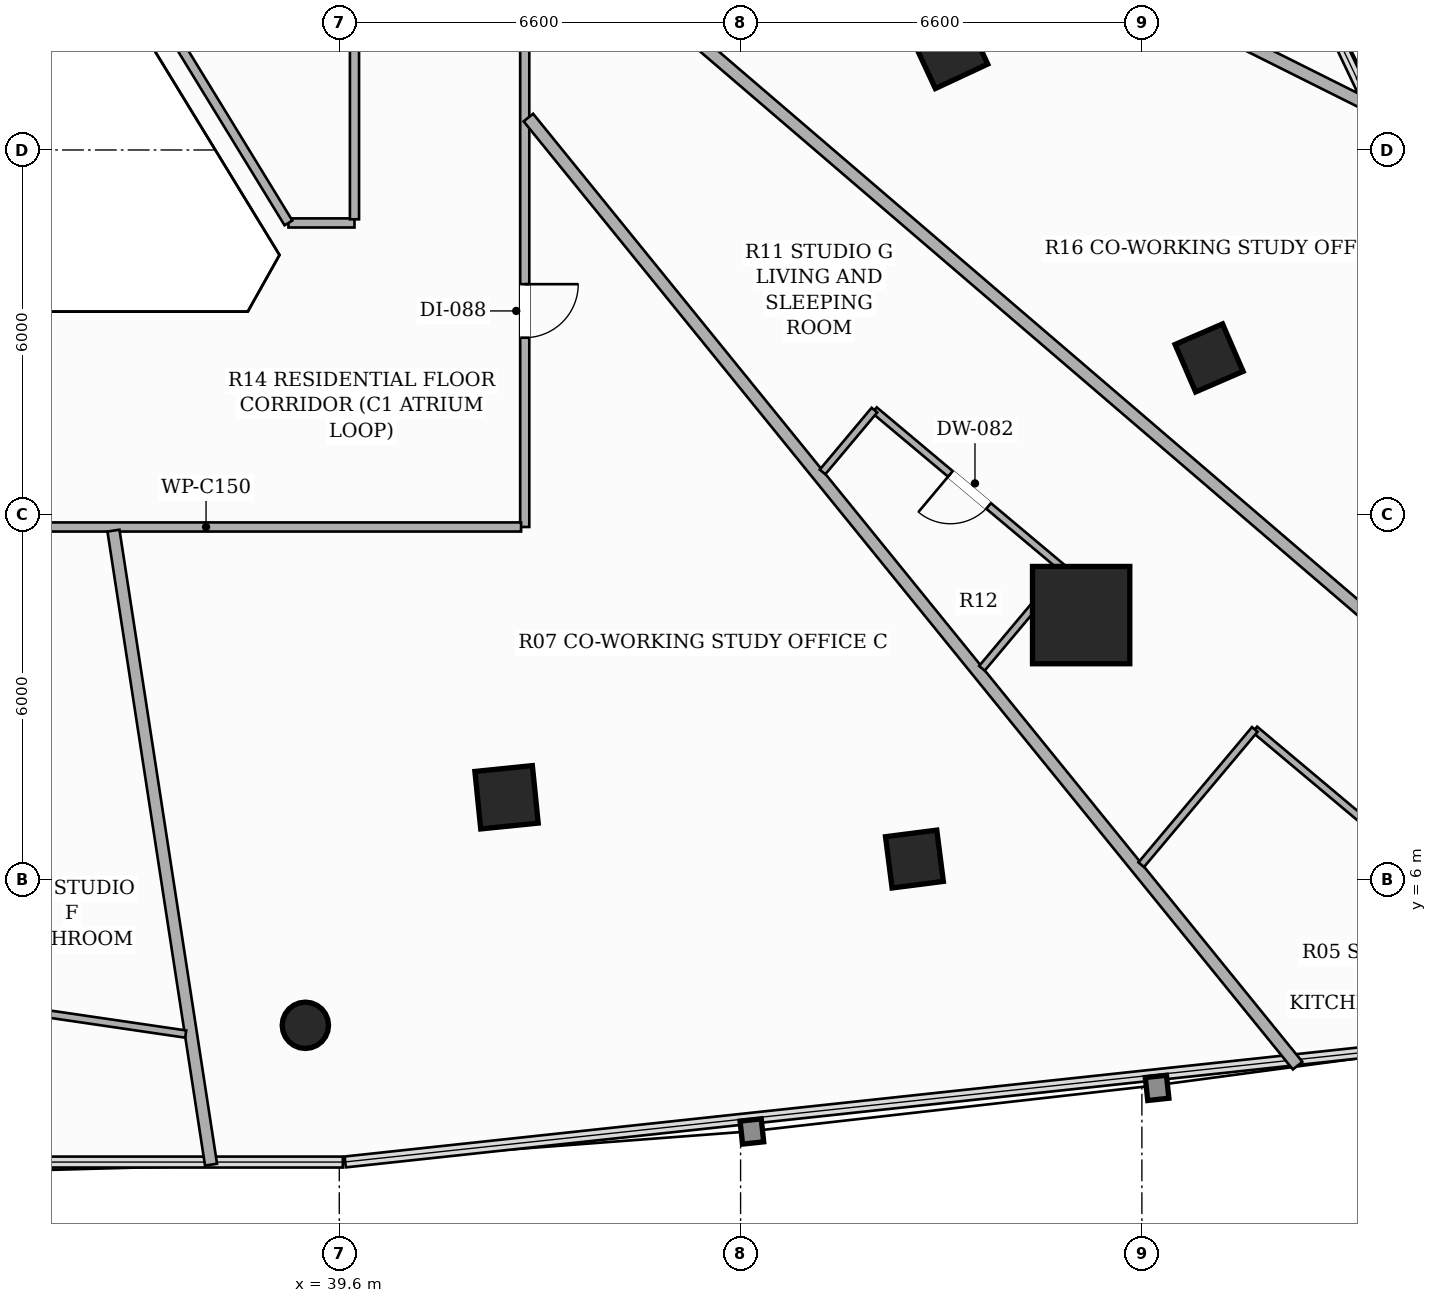
"""IFC4 building model, lengths in metres.
Left out: names, types, materials, properties, quantities, classifications, styles, units other than length and angle.
Written with IfcOpenShell. Run it as: python <this file> out.ifc"""

import sys

from ifc_helpers import new_model, si_unit, direction, frame, frame_2d, origin, origin_2d, place, context, subcontext, project, spatial, rectangle, hollow_rectangle, hollow_circle, extrude, element, fill, save


model = new_model("IFC4")
c1 = context("Model", 3, precision=1e-05, world=origin(), true_north=direction((0.0, 1.0)))
c2 = subcontext(c1, "Body", "Model", "MODEL_VIEW")
j1 = project(units=[si_unit("LENGTHUNIT", "METRE"), si_unit("PLANEANGLEUNIT", "RADIAN")], contexts=[c1])
p1 = place(None, origin())
s1 = spatial("IfcSite", under=j1, at=p1, CompositionType="ELEMENT")
p2 = place(p1, origin())
s2 = spatial("IfcBuilding", under=s1, at=p2, CompositionType="ELEMENT")
p3 = place(p2, frame((0.0, 0.0, 36.8)))
s3 = spatial("IfcBuildingStorey", under=s2, at=p3, CompositionType="ELEMENT", Elevation=36.8)
p4 = place(p3, frame((51.801, 10.351, 0.0), z_axis=(0.0, 0.0, 1.0), x_axis=(1.0, 0.0, 0.0)))
e1 = element("IfcColumn", 1, at=p4, inside=s3, PredefinedType="COLUMN", context=c2, shape_type="SweptSolid", body=[
    extrude(hollow_rectangle(XDim=1.6, YDim=1.6, WallThickness=0.05, at=origin_2d()), origin(), (0.0, 0.0, 1.0), 3.3),
])
for number, where, z_axis, x_axis in (
    (2, (42.351, 7.355, 0.0), (0.0, 0.0, 1.0), (0.995, 0.101, 0.0)),
    (3, (49.633, 19.642, 0.0), (0.0, 0.0, 1.0), (-0.423, 0.906, 0.0)),
):
    element("IfcColumn", number, at=place(p3, frame(where, z_axis=z_axis, x_axis=x_axis)), inside=s3, PredefinedType="COLUMN", context=c2, shape_type="SweptSolid", body=[
        extrude(hollow_rectangle(XDim=0.95, YDim=0.95, WallThickness=0.032, at=origin_2d()), origin(), (0.0, 0.0, 1.0), 3.3),
    ])
for number, where, z_axis, x_axis in (
    (4, (49.059, 6.339, 0.0), (0.0, 0.0, 1.0), (0.992, 0.127, 0.0)),
    (5, (53.905, 14.58, 0.0), (0.0, 0.0, 1.0), (-0.397, 0.918, 0.0)),
):
    element("IfcColumn", number, at=place(p3, frame(where, z_axis=z_axis, x_axis=x_axis)), inside=s3, PredefinedType="COLUMN", context=c2, shape_type="SweptSolid", body=[
        extrude(hollow_rectangle(XDim=0.85, YDim=0.85, WallThickness=0.028, at=origin_2d()), origin(), (0.0, 0.0, 1.0), 3.3),
    ])
p5 = place(p3, frame((39.042, 3.605, 0.0), z_axis=(0.0, 0.0, 1.0), x_axis=(1.0, 0.0, 0.0)))
e6 = element("IfcColumn", 6, at=p5, inside=s3, PredefinedType="COLUMN", context=c2, shape_type="SweptSolid", body=[
    extrude(hollow_circle(Radius=0.381, WallThickness=0.022, at=origin_2d()), origin(), (0.0, 0.0, 1.0), 3.3),
])
p6 = place(p3, frame((42.65, 36.84, 0.0), z_axis=(0.0, 0.0, 1.0), x_axis=(0.0, -1.0, 0.0)))
e7 = element("IfcWall", 7, at=p6, inside=s3, PredefinedType="PARTITIONING", context=c2, shape_type="SweptSolid", body=[
    extrude(rectangle(XDim=25.04, YDim=0.15, at=frame_2d((12.52, 0.0))), origin(), (0.0, 0.0, 1.0), 2.413),
])
p7 = place(p6, frame((1.219, 0.0, 0.0)))
e8 = element("IfcOpeningElement", 8, at=p7, cuts=e7, PredefinedType="OPENING", context=c2, shape_type="SweptSolid", body=[
    extrude(rectangle(XDim=0.88, YDim=2.1, at=frame_2d((0.44, 1.05))), frame((0.0, 0.085, 0.0), z_axis=(0.0, -1.0, 0.0), x_axis=(1.0, 0.0, 0.0)), (0.0, 0.0, 1.0), 0.17),
])
p8 = place(p6, frame((21.047, 0.0, 0.0)))
e9 = element("IfcOpeningElement", 9, at=p8, cuts=e7, PredefinedType="OPENING", context=c2, shape_type="SweptSolid", body=[
    extrude(rectangle(XDim=0.88, YDim=2.1, at=frame_2d((0.44, 1.05))), frame((0.0, 0.085, 0.0), z_axis=(0.0, -1.0, 0.0), x_axis=(1.0, 0.0, 0.0)), (0.0, 0.0, 1.0), 0.17),
])
p9 = place(p6, frame((16.029, 0.0, 0.0)))
e10 = element("IfcOpeningElement", 10, at=p9, cuts=e7, PredefinedType="OPENING", context=c2, shape_type="SweptSolid", body=[
    extrude(rectangle(XDim=0.92, YDim=2.15, at=frame_2d((0.46, 1.075))), frame((0.0, 0.085, 0.0), z_axis=(0.0, -1.0, 0.0), x_axis=(1.0, 0.0, 0.0)), (0.0, 0.0, 1.0), 0.17),
])
p10 = place(p6, frame((12.486, 0.0, 0.0)))
e11 = element("IfcOpeningElement", 11, at=p10, cuts=e7, PredefinedType="OPENING", context=c2, shape_type="SweptSolid", body=[
    extrude(rectangle(XDim=0.88, YDim=2.1, at=frame_2d((0.44, 1.05))), frame((0.0, 0.085, 0.0), z_axis=(0.0, -1.0, 0.0), x_axis=(1.0, 0.0, 0.0)), (0.0, 0.0, 1.0), 0.17),
])
p11 = place(p6, frame((6.638, 0.0, 0.0)))
e12 = element("IfcOpeningElement", 12, at=p11, cuts=e7, PredefinedType="OPENING", context=c2, shape_type="SweptSolid", body=[
    extrude(rectangle(XDim=0.92, YDim=2.15, at=frame_2d((0.46, 1.075))), frame((0.0, 0.085, 0.0), z_axis=(0.0, -1.0, 0.0), x_axis=(1.0, 0.0, 0.0)), (0.0, 0.0, 1.0), 0.17),
])
p12 = place(p3, frame((42.59, 11.8, 0.0), z_axis=(0.0, 0.0, 1.0), x_axis=(-1.0, 0.0, 0.0)))
e13 = element("IfcWall", 13, at=p12, inside=s3, PredefinedType="PARTITIONING", context=c2, shape_type="SweptSolid", body=[
    extrude(rectangle(XDim=19.24, YDim=0.15, at=frame_2d((9.62, 0.0))), origin(), (0.0, 0.0, 1.0), 2.669),
])
p13 = place(p12, frame((10.462, 0.0, 0.0)))
e14 = element("IfcOpeningElement", 14, at=p13, cuts=e13, PredefinedType="OPENING", context=c2, shape_type="SweptSolid", body=[
    extrude(rectangle(XDim=0.92, YDim=2.15, at=frame_2d((0.46, 1.075))), frame((0.0, 0.085, 0.0), z_axis=(0.0, -1.0, 0.0), x_axis=(1.0, 0.0, 0.0)), (0.0, 0.0, 1.0), 0.17),
])
p14 = place(p3, frame((38.764, 16.8, 0.0), z_axis=(0.0, 0.0, 1.0), x_axis=(1.0, 0.0, 0.0)))
e15 = element("IfcWall", 15, at=p14, inside=s3, PredefinedType="PARTITIONING", context=c2, shape_type="SweptSolid", body=[
    extrude(rectangle(XDim=1.086, YDim=0.15, at=frame_2d((0.543, 0.0))), origin(), (0.0, 0.0, 1.0), 3.06),
])
p15 = place(p3, frame((39.85, 16.86, 0.0), z_axis=(0.0, 0.0, 1.0), x_axis=(0.0, 1.0, 0.0)))
e16 = element("IfcWall", 16, at=p15, inside=s3, PredefinedType="PARTITIONING", context=c2, shape_type="SweptSolid", body=[
    extrude(rectangle(XDim=6.99, YDim=0.15, at=frame_2d((3.495, 0.0))), origin(), (0.0, 0.0, 1.0), 2.669),
])
p16 = place(p15, frame((3.055, 0.0, 0.0)))
e17 = element("IfcOpeningElement", 17, at=p16, cuts=e16, PredefinedType="OPENING", context=c2, shape_type="SweptSolid", body=[
    extrude(rectangle(XDim=0.88, YDim=2.1, at=frame_2d((0.44, 1.05))), frame((0.0, 0.085, 0.0), z_axis=(0.0, -1.0, 0.0), x_axis=(1.0, 0.0, 0.0)), (0.0, 0.0, 1.0), 0.17),
])
p17 = place(p3, frame((34.486, 23.79, 0.0), z_axis=(0.0, 0.0, 1.0), x_axis=(0.521998190399, -0.852946592244, 0.0)))
e18 = element("IfcWall", 18, at=p17, inside=s3, PredefinedType="PARTITIONING", context=c2, shape_type="SweptSolid", body=[
    extrude(rectangle(XDim=8.195, YDim=0.15, at=frame_2d((4.098, 0.0))), origin(), (0.0, 0.0, 1.0), 2.669),
])
p18 = place(p3, frame((37.491, 1.313, 0.0), z_axis=(0.0, 0.0, 1.0), x_axis=(-0.152133698634, 0.988359923176, 0.0)))
e19 = element("IfcWall", 19, at=p18, inside=s3, PredefinedType="PARTITIONING", context=c2, shape_type="SweptSolid", body=[
    extrude(rectangle(XDim=10.55, YDim=0.2, at=frame_2d((5.275, 0.0))), origin(), (0.0, 0.0, 1.0), 2.413),
])
p19 = place(p3, frame((42.71, 18.533, 0.0), z_axis=(0.0, 0.0, 1.0), x_axis=(0.630093983448, -0.776518880661, 0.0)))
e20 = element("IfcWall", 20, at=p19, inside=s3, PredefinedType="PARTITIONING", context=c2, shape_type="SweptSolid", body=[
    extrude(rectangle(XDim=20.078, YDim=0.2, at=frame_2d((10.039, 0.0))), origin(), (0.0, 0.0, 1.0), 2.413),
])
p20 = place(p3, frame((42.71, 22.173, 0.0), z_axis=(0.0, 0.0, 1.0), x_axis=(0.759115981911, -0.650955394791, 0.0)))
e21 = element("IfcWall", 21, at=p20, inside=s3, PredefinedType="PARTITIONING", context=c2, shape_type="SweptSolid", body=[
    extrude(rectangle(XDim=25.249, YDim=0.2, at=frame_2d((12.625, 0.0))), origin(), (0.0, 0.0, 1.0), 2.413),
])
p21 = place(p3, frame((42.71, 25.644, 0.0), z_axis=(0.0, 0.0, 1.0), x_axis=(0.894389742198, -0.447288485265, 0.0)))
e22 = element("IfcWall", 22, at=p21, inside=s3, PredefinedType="PARTITIONING", context=c2, shape_type="SweptSolid", body=[
    extrude(rectangle(XDim=15.648, YDim=0.2, at=frame_2d((7.824, 0.0))), origin(), (0.0, 0.0, 1.0), 2.413),
])
p22 = place(p3, frame((33.321, 4.011, 0.0), z_axis=(0.0, 0.0, 1.0), x_axis=(0.98942932615, -0.145015890698, 0.0)))
e23 = element("IfcWall", 23, at=p22, inside=s3, PredefinedType="PARTITIONING", context=c2, shape_type="SweptSolid", body=[
    extrude(rectangle(XDim=3.793, YDim=0.12, at=frame_2d((1.896, 0.0))), origin(), (0.0, 0.0, 1.0), 3.06),
])
p23 = place(p3, frame((50.169, 9.476, 0.0), z_axis=(0.0, 0.0, 1.0), x_axis=(0.642802339764, 0.766032082875, 0.0)))
e24 = element("IfcWall", 24, at=p23, inside=s3, PredefinedType="PARTITIONING", context=c2, shape_type="SweptSolid", body=[
    extrude(rectangle(XDim=2.116, YDim=0.12, at=frame_2d((1.058, 0.0))), origin(), (0.0, 0.0, 1.0), 2.413),
])
p24 = place(p3, frame((51.529, 11.097, 0.0), z_axis=(0.0, 0.0, 1.0), x_axis=(-0.766026296222, 0.642809235696, 0.0)))
e25 = element("IfcWall", 25, at=p24, inside=s3, PredefinedType="PARTITIONING", context=c2, shape_type="SweptSolid", body=[
    extrude(rectangle(XDim=4.084, YDim=0.12, at=frame_2d((2.042, 0.0))), origin(), (0.0, 0.0, 1.0), 2.413),
])
p25 = place(p24, frame((1.632, 0.0, 0.0)))
e26 = element("IfcOpeningElement", 26, at=p25, cuts=e25, PredefinedType="OPENING", context=c2, shape_type="SweptSolid", body=[
    extrude(rectangle(XDim=0.82, YDim=2.1, at=frame_2d((0.41, 1.05))), frame((0.0, 0.07, 0.0), z_axis=(0.0, -1.0, 0.0), x_axis=(1.0, 0.0, 0.0)), (0.0, 0.0, 1.0), 0.14),
])
p26 = place(p3, frame((48.401, 13.722, 0.0), z_axis=(0.0, 0.0, 1.0), x_axis=(-0.642587875402, -0.76621199572, 0.0)))
e27 = element("IfcWall", 27, at=p26, inside=s3, PredefinedType="PARTITIONING", context=c2, shape_type="SweptSolid", body=[
    extrude(rectangle(XDim=1.327, YDim=0.12, at=frame_2d((0.664, 0.0))), origin(), (0.0, 0.0, 1.0), 3.06),
])
p27 = place(p3, frame((60.287, 3.745, 0.0), z_axis=(0.0, 0.0, 1.0), x_axis=(-0.765937745649, 0.642914745351, 0.0)))
e28 = element("IfcWall", 28, at=p27, inside=s3, PredefinedType="PARTITIONING", context=c2, shape_type="SweptSolid", body=[
    extrude(rectangle(XDim=7.351, YDim=0.12, at=frame_2d((3.675, 0.0))), origin(), (0.0, 0.0, 1.0), 2.619),
])
p28 = place(p27, frame((3.235, 0.0, 0.0)))
e29 = element("IfcOpeningElement", 29, at=p28, cuts=e28, PredefinedType="OPENING", context=c2, shape_type="SweptSolid", body=[
    extrude(rectangle(XDim=0.88, YDim=2.1, at=frame_2d((0.44, 1.05))), frame((0.0, 0.07, 0.0), z_axis=(0.0, -1.0, 0.0), x_axis=(1.0, 0.0, 0.0)), (0.0, 0.0, 1.0), 0.14),
])
p29 = place(p3, frame((54.657, 8.471, 0.0), z_axis=(0.0, 0.0, 1.0), x_axis=(-0.6429989132, -0.765867088746, 0.0)))
e30 = element("IfcWall", 30, at=p29, inside=s3, PredefinedType="PARTITIONING", context=c2, shape_type="SweptSolid", body=[
    extrude(rectangle(XDim=2.905, YDim=0.12, at=frame_2d((1.453, 0.0))), origin(), (0.0, 0.0, 1.0), 3.06),
])
p30 = place(p8, origin())
e31 = element("IfcDoor", 31, at=p30, inside=s3, OperationType="SINGLE_SWING_LEFT", PredefinedType="DOOR", context=c2, shape_type="SweptSolid", body=[
    extrude(rectangle(XDim=0.88, YDim=2.1, at=frame_2d((0.44, 1.05))), frame((0.0, 0.025, 0.0), z_axis=(0.0, -1.0, 0.0), x_axis=(1.0, 0.0, 0.0)), (0.0, 0.0, 1.0), 0.05),
])
fill(e9, e31)
p31 = place(p25, origin())
e32 = element("IfcDoor", 32, at=p31, inside=s3, OperationType="SINGLE_SWING_RIGHT", PredefinedType="DOOR", context=c2, shape_type="SweptSolid", body=[
    extrude(rectangle(XDim=0.82, YDim=2.1, at=frame_2d((0.41, 1.05))), frame((0.0, 0.025, 0.0), z_axis=(0.0, -1.0, 0.0), x_axis=(1.0, 0.0, 0.0)), (0.0, 0.0, 1.0), 0.05),
])
fill(e26, e32)
save(model, sys.argv[1])
